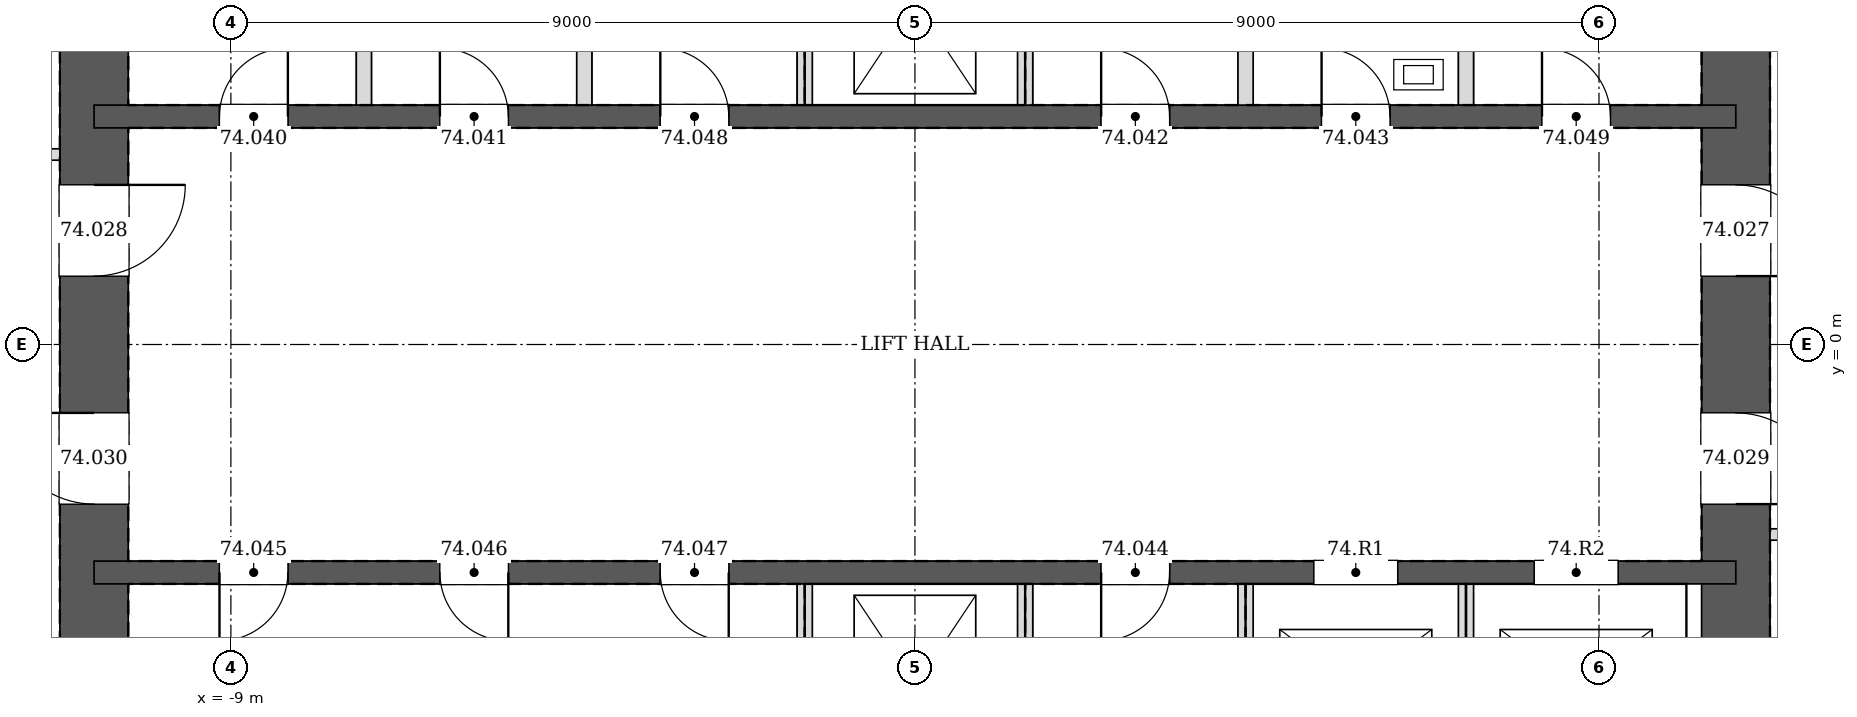
"""IFC4 building model, lengths in metres.
Left out: names, types, materials, properties, quantities, classifications, styles, units other than length and angle.
Written with IfcOpenShell. Run it as: python <this file> out.ifc"""

import sys

from ifc_helpers import new_model, si_unit, direction, frame, frame_2d, origin, place, context, subcontext, project, spatial, rectangle, extrude, element, fill, save


model = new_model("IFC4")
c1 = context("Model", 3, precision=1e-05, world=origin(), true_north=direction((0.0, 1.0)))
c2 = subcontext(c1, "Body", "Model", "MODEL_VIEW")
j1 = project(units=[si_unit("LENGTHUNIT", "METRE"), si_unit("PLANEANGLEUNIT", "RADIAN")], contexts=[c1])
p1 = place(None, origin())
s1 = spatial("IfcSite", under=j1, at=p1, CompositionType="ELEMENT")
p2 = place(p1, origin())
s2 = spatial("IfcBuilding", under=s1, at=p2, CompositionType="ELEMENT")
p3 = place(p2, frame((0.0, 0.0, 301.4)))
s3 = spatial("IfcBuildingStorey", under=s2, at=p3, CompositionType="ELEMENT", Elevation=301.4)
p4 = place(p3, frame((10.8, -10.8, 0.0), z_axis=(0.0, 0.0, 1.0), x_axis=(0.0, 1.0, 0.0)))
e1 = element("IfcWall", 1, at=p4, inside=s3, PredefinedType="SOLIDWALL", context=c2, shape_type="SweptSolid", body=[
    extrude(rectangle(XDim=21.6, YDim=0.9, at=frame_2d((10.8, 0.0))), origin(), (0.0, 0.0, 1.0), 3.4),
])
p5 = place(p4, frame((11.7, 0.0, 0.0)))
e2 = element("IfcOpeningElement", 2, at=p5, cuts=e1, PredefinedType="OPENING", context=c2, shape_type="SweptSolid", body=[
    extrude(rectangle(XDim=1.2, YDim=2.1, at=frame_2d((0.6, 1.05))), frame((0.0, 0.46, 0.0), z_axis=(0.0, -1.0, 0.0), x_axis=(1.0, 0.0, 0.0)), (0.0, 0.0, 1.0), 0.92),
])
p6 = place(p4, frame((8.7, 0.0, 0.0)))
e3 = element("IfcOpeningElement", 3, at=p6, cuts=e1, PredefinedType="OPENING", context=c2, shape_type="SweptSolid", body=[
    extrude(rectangle(XDim=1.2, YDim=2.1, at=frame_2d((0.6, 1.05))), frame((0.0, 0.46, 0.0), z_axis=(0.0, -1.0, 0.0), x_axis=(1.0, 0.0, 0.0)), (0.0, 0.0, 1.0), 0.92),
])
p7 = place(p3, frame((-10.8, 10.8, 0.0), z_axis=(0.0, 0.0, 1.0), x_axis=(0.0, -1.0, 0.0)))
e4 = element("IfcWall", 4, at=p7, inside=s3, PredefinedType="SOLIDWALL", context=c2, shape_type="SweptSolid", body=[
    extrude(rectangle(XDim=21.6, YDim=0.9, at=frame_2d((10.8, 0.0))), origin(), (0.0, 0.0, 1.0), 3.4),
])
p8 = place(p7, frame((8.7, 0.0, 0.0)))
e5 = element("IfcOpeningElement", 5, at=p8, cuts=e4, PredefinedType="OPENING", context=c2, shape_type="SweptSolid", body=[
    extrude(rectangle(XDim=1.2, YDim=2.1, at=frame_2d((0.6, 1.05))), frame((0.0, 0.46, 0.0), z_axis=(0.0, -1.0, 0.0), x_axis=(1.0, 0.0, 0.0)), (0.0, 0.0, 1.0), 0.92),
])
p9 = place(p7, frame((11.7, 0.0, 0.0)))
e6 = element("IfcOpeningElement", 6, at=p9, cuts=e4, PredefinedType="OPENING", context=c2, shape_type="SweptSolid", body=[
    extrude(rectangle(XDim=1.2, YDim=2.1, at=frame_2d((0.6, 1.05))), frame((0.0, 0.46, 0.0), z_axis=(0.0, -1.0, 0.0), x_axis=(1.0, 0.0, 0.0)), (0.0, 0.0, 1.0), 0.92),
])
p10 = place(p3, frame((-10.8, 3.0, 0.0), z_axis=(0.0, 0.0, 1.0), x_axis=(1.0, 0.0, 0.0)))
e7 = element("IfcWall", 7, at=p10, inside=s3, PredefinedType="SOLIDWALL", context=c2, shape_type="SweptSolid", body=[
    extrude(rectangle(XDim=21.6, YDim=0.3, at=frame_2d((10.8, 0.0))), origin(), (0.0, 0.0, 1.0), 3.4),
])
p11 = place(p10, frame((1.65, 0.0, 0.0)))
e8 = element("IfcOpeningElement", 8, at=p11, cuts=e7, PredefinedType="OPENING", context=c2, shape_type="SweptSolid", body=[
    extrude(rectangle(XDim=0.9, YDim=2.1, at=frame_2d((0.45, 1.05))), frame((0.0, 0.16, 0.0), z_axis=(0.0, -1.0, 0.0), x_axis=(1.0, 0.0, 0.0)), (0.0, 0.0, 1.0), 0.32),
])
p12 = place(p10, frame((4.55, 0.0, 0.0)))
e9 = element("IfcOpeningElement", 9, at=p12, cuts=e7, PredefinedType="OPENING", context=c2, shape_type="SweptSolid", body=[
    extrude(rectangle(XDim=0.9, YDim=2.1, at=frame_2d((0.45, 1.05))), frame((0.0, 0.16, 0.0), z_axis=(0.0, -1.0, 0.0), x_axis=(1.0, 0.0, 0.0)), (0.0, 0.0, 1.0), 0.32),
])
p13 = place(p10, frame((13.25, 0.0, 0.0)))
e10 = element("IfcOpeningElement", 10, at=p13, cuts=e7, PredefinedType="OPENING", context=c2, shape_type="SweptSolid", body=[
    extrude(rectangle(XDim=0.9, YDim=2.1, at=frame_2d((0.45, 1.05))), frame((0.0, 0.16, 0.0), z_axis=(0.0, -1.0, 0.0), x_axis=(1.0, 0.0, 0.0)), (0.0, 0.0, 1.0), 0.32),
])
p14 = place(p10, frame((16.15, 0.0, 0.0)))
e11 = element("IfcOpeningElement", 11, at=p14, cuts=e7, PredefinedType="OPENING", context=c2, shape_type="SweptSolid", body=[
    extrude(rectangle(XDim=0.9, YDim=2.1, at=frame_2d((0.45, 1.05))), frame((0.0, 0.16, 0.0), z_axis=(0.0, -1.0, 0.0), x_axis=(1.0, 0.0, 0.0)), (0.0, 0.0, 1.0), 0.32),
])
p15 = place(p10, frame((7.45, 0.0, 0.0)))
e12 = element("IfcOpeningElement", 12, at=p15, cuts=e7, PredefinedType="OPENING", context=c2, shape_type="SweptSolid", body=[
    extrude(rectangle(XDim=0.9, YDim=2.1, at=frame_2d((0.45, 1.05))), frame((0.0, 0.16, 0.0), z_axis=(0.0, -1.0, 0.0), x_axis=(1.0, 0.0, 0.0)), (0.0, 0.0, 1.0), 0.32),
])
p16 = place(p10, frame((19.05, 0.0, 0.0)))
e13 = element("IfcOpeningElement", 13, at=p16, cuts=e7, PredefinedType="OPENING", context=c2, shape_type="SweptSolid", body=[
    extrude(rectangle(XDim=0.9, YDim=2.1, at=frame_2d((0.45, 1.05))), frame((0.0, 0.16, 0.0), z_axis=(0.0, -1.0, 0.0), x_axis=(1.0, 0.0, 0.0)), (0.0, 0.0, 1.0), 0.32),
])
p17 = place(p3, frame((-10.8, -3.0, 0.0), z_axis=(0.0, 0.0, 1.0), x_axis=(1.0, 0.0, 0.0)))
e14 = element("IfcWall", 14, at=p17, inside=s3, PredefinedType="SOLIDWALL", context=c2, shape_type="SweptSolid", body=[
    extrude(rectangle(XDim=21.6, YDim=0.3, at=frame_2d((10.8, 0.0))), origin(), (0.0, 0.0, 1.0), 3.4),
])
p18 = place(p17, frame((13.25, 0.0, 0.0)))
e15 = element("IfcOpeningElement", 15, at=p18, cuts=e14, PredefinedType="OPENING", context=c2, shape_type="SweptSolid", body=[
    extrude(rectangle(XDim=0.9, YDim=2.1, at=frame_2d((0.45, 1.05))), frame((0.0, 0.16, 0.0), z_axis=(0.0, -1.0, 0.0), x_axis=(1.0, 0.0, 0.0)), (0.0, 0.0, 1.0), 0.32),
])
p19 = place(p17, frame((1.65, 0.0, 0.0)))
e16 = element("IfcOpeningElement", 16, at=p19, cuts=e14, PredefinedType="OPENING", context=c2, shape_type="SweptSolid", body=[
    extrude(rectangle(XDim=0.9, YDim=2.1, at=frame_2d((0.45, 1.05))), frame((0.0, 0.16, 0.0), z_axis=(0.0, -1.0, 0.0), x_axis=(1.0, 0.0, 0.0)), (0.0, 0.0, 1.0), 0.32),
])
p20 = place(p17, frame((4.55, 0.0, 0.0)))
e17 = element("IfcOpeningElement", 17, at=p20, cuts=e14, PredefinedType="OPENING", context=c2, shape_type="SweptSolid", body=[
    extrude(rectangle(XDim=0.9, YDim=2.1, at=frame_2d((0.45, 1.05))), frame((0.0, 0.16, 0.0), z_axis=(0.0, -1.0, 0.0), x_axis=(1.0, 0.0, 0.0)), (0.0, 0.0, 1.0), 0.32),
])
p21 = place(p17, frame((7.45, 0.0, 0.0)))
e18 = element("IfcOpeningElement", 18, at=p21, cuts=e14, PredefinedType="OPENING", context=c2, shape_type="SweptSolid", body=[
    extrude(rectangle(XDim=0.9, YDim=2.1, at=frame_2d((0.45, 1.05))), frame((0.0, 0.16, 0.0), z_axis=(0.0, -1.0, 0.0), x_axis=(1.0, 0.0, 0.0)), (0.0, 0.0, 1.0), 0.32),
])
p22 = place(p17, frame((16.05, 0.0, 0.0)))
e19 = element("IfcOpeningElement", 19, at=p22, cuts=e14, PredefinedType="OPENING", context=c2, shape_type="SweptSolid", body=[
    extrude(rectangle(XDim=1.1, YDim=2.1, at=frame_2d((0.55, 1.05))), frame((0.0, 0.16, 0.0), z_axis=(0.0, -1.0, 0.0), x_axis=(1.0, 0.0, 0.0)), (0.0, 0.0, 1.0), 0.32),
])
p23 = place(p17, frame((18.95, 0.0, 0.0)))
e20 = element("IfcOpeningElement", 20, at=p23, cuts=e14, PredefinedType="OPENING", context=c2, shape_type="SweptSolid", body=[
    extrude(rectangle(XDim=1.1, YDim=2.1, at=frame_2d((0.55, 1.05))), frame((0.0, 0.16, 0.0), z_axis=(0.0, -1.0, 0.0), x_axis=(1.0, 0.0, 0.0)), (0.0, 0.0, 1.0), 0.32),
])
p24 = place(p3, frame((11.25, -2.5, 0.0), z_axis=(0.0, 0.0, 1.0), x_axis=(1.0, 0.0, 0.0)))
e21 = element("IfcWall", 21, at=p24, inside=s3, PredefinedType="PARTITIONING", context=c2, shape_type="SweptSolid", body=[
    extrude(rectangle(XDim=1.65, YDim=0.15, at=frame_2d((0.825, 0.0))), origin(), (0.0, 0.0, 1.0), 3.2),
])
p25 = place(p3, frame((-11.25, 2.5, 0.0), z_axis=(0.0, 0.0, 1.0), x_axis=(-1.0, 0.0, 0.0)))
e22 = element("IfcWall", 22, at=p25, inside=s3, PredefinedType="PARTITIONING", context=c2, shape_type="SweptSolid", body=[
    extrude(rectangle(XDim=1.65, YDim=0.15, at=frame_2d((0.825, 0.0))), origin(), (0.0, 0.0, 1.0), 3.2),
])
p26 = place(p25, frame((0.35, 0.0, 0.0)))
e23 = element("IfcOpeningElement", 23, at=p26, cuts=e22, PredefinedType="OPENING", context=c2, shape_type="SweptSolid", body=[
    extrude(rectangle(XDim=0.95, YDim=2.1, at=frame_2d((0.475, 1.05))), frame((0.0, 0.085, 0.0), z_axis=(0.0, -1.0, 0.0), x_axis=(1.0, 0.0, 0.0)), (0.0, 0.0, 1.0), 0.17),
])
for number, where, z_axis, x_axis in (
    (24, (-7.25, 3.15, 0.0), (0.0, 0.0, 1.0), (0.0, 1.0, 0.0)),
    (25, (-4.35, 3.15, 0.0), (0.0, 0.0, 1.0), (0.0, 1.0, 0.0)),
    (26, (-1.45, 3.15, 0.0), (0.0, 0.0, 1.0), (0.0, 1.0, 0.0)),
    (27, (1.45, 3.15, 0.0), (0.0, 0.0, 1.0), (0.0, 1.0, 0.0)),
    (28, (4.35, 3.15, 0.0), (0.0, 0.0, 1.0), (0.0, 1.0, 0.0)),
    (29, (7.25, 3.15, 0.0), (0.0, 0.0, 1.0), (0.0, 1.0, 0.0)),
    (30, (-1.45, -5.85, 0.0), (0.0, 0.0, 1.0), (0.0, 1.0, 0.0)),
    (31, (1.45, -5.85, 0.0), (0.0, 0.0, 1.0), (0.0, 1.0, 0.0)),
    (32, (4.35, -5.85, 0.0), (0.0, 0.0, 1.0), (0.0, 1.0, 0.0)),
):
    element("IfcWall", number, at=place(p3, frame(where, z_axis=z_axis, x_axis=x_axis)), inside=s3, PredefinedType="PARTITIONING", context=c2, shape_type="SweptSolid", body=[
        extrude(rectangle(XDim=2.7, YDim=0.2, at=frame_2d((1.35, 0.0))), origin(), (0.0, 0.0, 1.0), 3.2),
    ])
p27 = place(p3, frame((7.25, -5.85, 0.0), z_axis=(0.0, 0.0, 1.0), x_axis=(0.0, 1.0, 0.0)))
e33 = element("IfcWall", 33, at=p27, inside=s3, PredefinedType="PARTITIONING", context=c2, shape_type="SweptSolid", body=[
    extrude(rectangle(XDim=2.7, YDim=0.2, at=frame_2d((1.35, 0.0))), origin(), (0.0, 0.0, 1.0), 3.4),
])
p28 = place(p5, frame((1.2, 0.0, 0.0), z_axis=(0.0, 0.0, 1.0), x_axis=(-1.0, 0.0, 0.0)))
e34 = element("IfcDoor", 34, at=p28, inside=s3, OperationType="SINGLE_SWING_RIGHT", PredefinedType="DOOR", context=c2, shape_type="SweptSolid", body=[
    extrude(rectangle(XDim=1.2, YDim=2.1, at=frame_2d((0.6, 1.05))), frame((0.0, 0.025, 0.0), z_axis=(0.0, -1.0, 0.0), x_axis=(1.0, 0.0, 0.0)), (0.0, 0.0, 1.0), 0.05),
])
fill(e2, e34)
p29 = place(p8, origin())
e35 = element("IfcDoor", 35, at=p29, inside=s3, OperationType="SINGLE_SWING_LEFT", PredefinedType="DOOR", context=c2, shape_type="SweptSolid", body=[
    extrude(rectangle(XDim=1.2, YDim=2.1, at=frame_2d((0.6, 1.05))), frame((0.0, 0.025, 0.0), z_axis=(0.0, -1.0, 0.0), x_axis=(1.0, 0.0, 0.0)), (0.0, 0.0, 1.0), 0.05),
])
fill(e5, e35)
p30 = place(p6, frame((1.2, 0.0, 0.0), z_axis=(0.0, 0.0, 1.0), x_axis=(-1.0, 0.0, 0.0)))
e36 = element("IfcDoor", 36, at=p30, inside=s3, OperationType="SINGLE_SWING_RIGHT", PredefinedType="DOOR", context=c2, shape_type="SweptSolid", body=[
    extrude(rectangle(XDim=1.2, YDim=2.1, at=frame_2d((0.6, 1.05))), frame((0.0, 0.025, 0.0), z_axis=(0.0, -1.0, 0.0), x_axis=(1.0, 0.0, 0.0)), (0.0, 0.0, 1.0), 0.05),
])
fill(e3, e36)
p31 = place(p9, frame((1.2, 0.0, 0.0), z_axis=(0.0, 0.0, 1.0), x_axis=(-1.0, 0.0, 0.0)))
e37 = element("IfcDoor", 37, at=p31, inside=s3, OperationType="SINGLE_SWING_RIGHT", PredefinedType="DOOR", context=c2, shape_type="SweptSolid", body=[
    extrude(rectangle(XDim=1.2, YDim=2.1, at=frame_2d((0.6, 1.05))), frame((0.0, 0.025, 0.0), z_axis=(0.0, -1.0, 0.0), x_axis=(1.0, 0.0, 0.0)), (0.0, 0.0, 1.0), 0.05),
])
fill(e6, e37)
p32 = place(p11, origin())
e38 = element("IfcDoor", 38, at=p32, inside=s3, OperationType="SINGLE_SWING_RIGHT", PredefinedType="DOOR", context=c2, shape_type="SweptSolid", body=[
    extrude(rectangle(XDim=0.9, YDim=2.1, at=frame_2d((0.45, 1.05))), frame((0.0, 0.025, 0.0), z_axis=(0.0, -1.0, 0.0), x_axis=(1.0, 0.0, 0.0)), (0.0, 0.0, 1.0), 0.05),
])
fill(e8, e38)
p33 = place(p12, origin())
e39 = element("IfcDoor", 39, at=p33, inside=s3, OperationType="SINGLE_SWING_LEFT", PredefinedType="DOOR", context=c2, shape_type="SweptSolid", body=[
    extrude(rectangle(XDim=0.9, YDim=2.1, at=frame_2d((0.45, 1.05))), frame((0.0, 0.025, 0.0), z_axis=(0.0, -1.0, 0.0), x_axis=(1.0, 0.0, 0.0)), (0.0, 0.0, 1.0), 0.05),
])
fill(e9, e39)
p34 = place(p13, origin())
e40 = element("IfcDoor", 40, at=p34, inside=s3, OperationType="SINGLE_SWING_LEFT", PredefinedType="DOOR", context=c2, shape_type="SweptSolid", body=[
    extrude(rectangle(XDim=0.9, YDim=2.1, at=frame_2d((0.45, 1.05))), frame((0.0, 0.025, 0.0), z_axis=(0.0, -1.0, 0.0), x_axis=(1.0, 0.0, 0.0)), (0.0, 0.0, 1.0), 0.05),
])
fill(e10, e40)
p35 = place(p14, origin())
e41 = element("IfcDoor", 41, at=p35, inside=s3, OperationType="SINGLE_SWING_LEFT", PredefinedType="DOOR", context=c2, shape_type="SweptSolid", body=[
    extrude(rectangle(XDim=0.9, YDim=2.1, at=frame_2d((0.45, 1.05))), frame((0.0, 0.025, 0.0), z_axis=(0.0, -1.0, 0.0), x_axis=(1.0, 0.0, 0.0)), (0.0, 0.0, 1.0), 0.05),
])
fill(e11, e41)
p36 = place(p18, frame((0.9, 0.0, 0.0), z_axis=(0.0, 0.0, 1.0), x_axis=(-1.0, 0.0, 0.0)))
e42 = element("IfcDoor", 42, at=p36, inside=s3, OperationType="SINGLE_SWING_RIGHT", PredefinedType="DOOR", context=c2, shape_type="SweptSolid", body=[
    extrude(rectangle(XDim=0.9, YDim=2.1, at=frame_2d((0.45, 1.05))), frame((0.0, 0.025, 0.0), z_axis=(0.0, -1.0, 0.0), x_axis=(1.0, 0.0, 0.0)), (0.0, 0.0, 1.0), 0.05),
])
fill(e15, e42)
p37 = place(p19, frame((0.9, 0.0, 0.0), z_axis=(0.0, 0.0, 1.0), x_axis=(-1.0, 0.0, 0.0)))
e43 = element("IfcDoor", 43, at=p37, inside=s3, OperationType="SINGLE_SWING_RIGHT", PredefinedType="DOOR", context=c2, shape_type="SweptSolid", body=[
    extrude(rectangle(XDim=0.9, YDim=2.1, at=frame_2d((0.45, 1.05))), frame((0.0, 0.025, 0.0), z_axis=(0.0, -1.0, 0.0), x_axis=(1.0, 0.0, 0.0)), (0.0, 0.0, 1.0), 0.05),
])
fill(e16, e43)
p38 = place(p20, frame((0.9, 0.0, 0.0), z_axis=(0.0, 0.0, 1.0), x_axis=(-1.0, 0.0, 0.0)))
e44 = element("IfcDoor", 44, at=p38, inside=s3, OperationType="SINGLE_SWING_LEFT", PredefinedType="DOOR", context=c2, shape_type="SweptSolid", body=[
    extrude(rectangle(XDim=0.9, YDim=2.1, at=frame_2d((0.45, 1.05))), frame((0.0, 0.025, 0.0), z_axis=(0.0, -1.0, 0.0), x_axis=(1.0, 0.0, 0.0)), (0.0, 0.0, 1.0), 0.05),
])
fill(e17, e44)
p39 = place(p21, frame((0.9, 0.0, 0.0), z_axis=(0.0, 0.0, 1.0), x_axis=(-1.0, 0.0, 0.0)))
e45 = element("IfcDoor", 45, at=p39, inside=s3, OperationType="SINGLE_SWING_LEFT", PredefinedType="DOOR", context=c2, shape_type="SweptSolid", body=[
    extrude(rectangle(XDim=0.9, YDim=2.1, at=frame_2d((0.45, 1.05))), frame((0.0, 0.025, 0.0), z_axis=(0.0, -1.0, 0.0), x_axis=(1.0, 0.0, 0.0)), (0.0, 0.0, 1.0), 0.05),
])
fill(e18, e45)
p40 = place(p15, origin())
e46 = element("IfcDoor", 46, at=p40, inside=s3, OperationType="SINGLE_SWING_LEFT", PredefinedType="DOOR", context=c2, shape_type="SweptSolid", body=[
    extrude(rectangle(XDim=0.9, YDim=2.1, at=frame_2d((0.45, 1.05))), frame((0.0, 0.025, 0.0), z_axis=(0.0, -1.0, 0.0), x_axis=(1.0, 0.0, 0.0)), (0.0, 0.0, 1.0), 0.05),
])
fill(e12, e46)
p41 = place(p16, origin())
e47 = element("IfcDoor", 47, at=p41, inside=s3, OperationType="SINGLE_SWING_LEFT", PredefinedType="DOOR", context=c2, shape_type="SweptSolid", body=[
    extrude(rectangle(XDim=0.9, YDim=2.1, at=frame_2d((0.45, 1.05))), frame((0.0, 0.025, 0.0), z_axis=(0.0, -1.0, 0.0), x_axis=(1.0, 0.0, 0.0)), (0.0, 0.0, 1.0), 0.05),
])
fill(e13, e47)
p42 = place(p22, origin())
e48 = element("IfcDoor", 48, at=p42, inside=s3, OperationType="DOUBLE_DOOR_SLIDING", PredefinedType="DOOR", context=c2, shape_type="SweptSolid", body=[
    extrude(rectangle(XDim=1.1, YDim=2.1, at=frame_2d((0.55, 1.05))), frame((0.0, 0.025, 0.0), z_axis=(0.0, -1.0, 0.0), x_axis=(1.0, 0.0, 0.0)), (0.0, 0.0, 1.0), 0.05),
])
fill(e19, e48)
p43 = place(p23, origin())
e49 = element("IfcDoor", 49, at=p43, inside=s3, OperationType="DOUBLE_DOOR_SLIDING", PredefinedType="DOOR", context=c2, shape_type="SweptSolid", body=[
    extrude(rectangle(XDim=1.1, YDim=2.1, at=frame_2d((0.55, 1.05))), frame((0.0, 0.025, 0.0), z_axis=(0.0, -1.0, 0.0), x_axis=(1.0, 0.0, 0.0)), (0.0, 0.0, 1.0), 0.05),
])
fill(e20, e49)
save(model, sys.argv[1])
